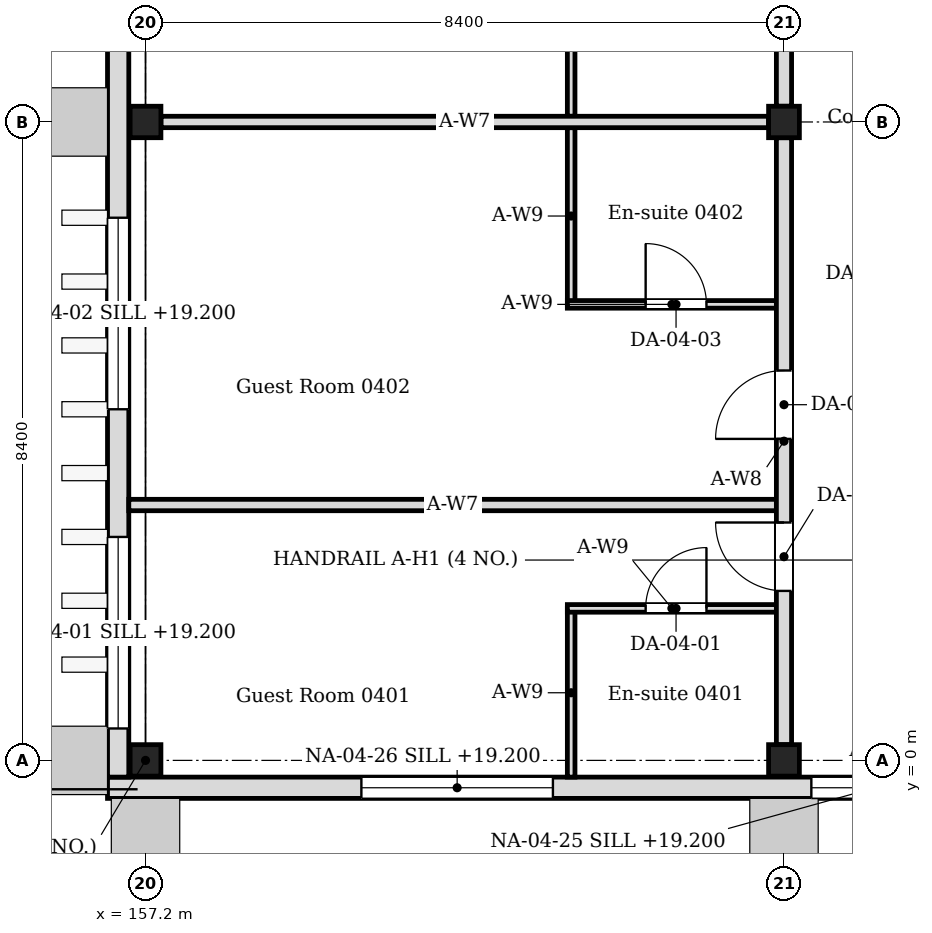
"""IFC4 building model, lengths in metres.
Left out: names, types, materials, properties, quantities, classifications, styles, units other than length and angle.
Written with IfcOpenShell. Run it as: python <this file> out.ifc"""

import sys

from ifc_helpers import new_model, si_unit, direction, frame, frame_2d, origin, origin_2d, place, context, subcontext, project, spatial, rectangle, i_section, extrude, element, fill, save


model = new_model("IFC4")
c1 = context("Model", 3, precision=1e-05, world=origin(), true_north=direction((0.0, 1.0)))
c2 = subcontext(c1, "Body", "Model", "MODEL_VIEW")
j1 = project(units=[si_unit("LENGTHUNIT", "METRE"), si_unit("PLANEANGLEUNIT", "RADIAN")], contexts=[c1])
p1 = place(None, origin())
s1 = spatial("IfcSite", under=j1, at=p1, CompositionType="ELEMENT")
p2 = place(p1, origin())
s2 = spatial("IfcBuilding", under=s1, at=p2, CompositionType="ELEMENT")
p3 = place(p2, frame((0.0, 0.0, 18.6)))
s3 = spatial("IfcBuildingStorey", under=s2, at=p3, CompositionType="ELEMENT", Elevation=18.6)
for number, where, z_axis, x_axis in (
    (1, (157.2, 0.0, 0.0), (0.0, 0.0, 1.0), (1.0, 0.0, 0.0)),
    (2, (157.2, 8.4, 0.0), (0.0, 0.0, 1.0), (1.0, 0.0, 0.0)),
    (3, (165.6, 0.0, 0.0), (0.0, 0.0, 1.0), (1.0, 0.0, 0.0)),
    (4, (165.6, 8.4, 0.0), (0.0, 0.0, 1.0), (1.0, 0.0, 0.0)),
):
    element("IfcColumn", number, at=place(p3, frame(where, z_axis=z_axis, x_axis=x_axis)), inside=s3, PredefinedType="COLUMN", context=c2, shape_type="SweptSolid", body=[
        extrude(i_section(OverallWidth=0.405, OverallDepth=0.414, WebThickness=0.018, FlangeThickness=0.028, FilletRadius=0.022, at=origin_2d()), origin(), (0.0, 0.0, 1.0), 4.2),
    ])
p4 = place(p3, frame((156.84, -0.22, 0.0), z_axis=(0.0, 0.0, 1.0), x_axis=(0.0, 1.0, 0.0)))
e5 = element("IfcWall", 5, at=p4, inside=s3, PredefinedType="SOLIDWALL", context=c2, shape_type="SweptSolid", body=[
    extrude(rectangle(XDim=25.77, YDim=0.28, at=frame_2d((12.885, 0.0))), origin(), (0.0, 0.0, 1.0), 4.05),
])
p5 = place(p4, frame((0.64, 0.0, 0.6)))
e6 = element("IfcOpeningElement", 6, at=p5, cuts=e5, PredefinedType="OPENING", context=c2, shape_type="SweptSolid", body=[
    extrude(rectangle(XDim=2.52, YDim=2.4, at=frame_2d((1.26, 1.2))), frame((0.0, 0.15, 0.0), z_axis=(0.0, -1.0, 0.0), x_axis=(1.0, 0.0, 0.0)), (0.0, 0.0, 1.0), 0.3),
])
p6 = place(p4, frame((4.84, 0.0, 0.6)))
e7 = element("IfcOpeningElement", 7, at=p6, cuts=e5, PredefinedType="OPENING", context=c2, shape_type="SweptSolid", body=[
    extrude(rectangle(XDim=2.52, YDim=2.4, at=frame_2d((1.26, 1.2))), frame((0.0, 0.15, 0.0), z_axis=(0.0, -1.0, 0.0), x_axis=(1.0, 0.0, 0.0)), (0.0, 0.0, 1.0), 0.3),
])
p7 = place(p4, frame((9.88, 0.0, 0.6)))
e8 = element("IfcOpeningElement", 8, at=p7, cuts=e5, PredefinedType="OPENING", context=c2, shape_type="SweptSolid", body=[
    extrude(rectangle(XDim=2.52, YDim=2.4, at=frame_2d((1.26, 1.2))), frame((0.0, 0.15, 0.0), z_axis=(0.0, -1.0, 0.0), x_axis=(1.0, 0.0, 0.0)), (0.0, 0.0, 1.0), 0.3),
])
p8 = place(p4, frame((14.08, 0.0, 0.6)))
e9 = element("IfcOpeningElement", 9, at=p8, cuts=e5, PredefinedType="OPENING", context=c2, shape_type="SweptSolid", body=[
    extrude(rectangle(XDim=2.52, YDim=2.4, at=frame_2d((1.26, 1.2))), frame((0.0, 0.15, 0.0), z_axis=(0.0, -1.0, 0.0), x_axis=(1.0, 0.0, 0.0)), (0.0, 0.0, 1.0), 0.3),
])
p9 = place(p4, frame((18.28, 0.0, 0.6)))
e10 = element("IfcOpeningElement", 10, at=p9, cuts=e5, PredefinedType="OPENING", context=c2, shape_type="SweptSolid", body=[
    extrude(rectangle(XDim=2.52, YDim=2.4, at=frame_2d((1.26, 1.2))), frame((0.0, 0.15, 0.0), z_axis=(0.0, -1.0, 0.0), x_axis=(1.0, 0.0, 0.0)), (0.0, 0.0, 1.0), 0.3),
])
p10 = place(p4, frame((22.48, 0.0, 0.6)))
e11 = element("IfcOpeningElement", 11, at=p10, cuts=e5, PredefinedType="OPENING", context=c2, shape_type="SweptSolid", body=[
    extrude(rectangle(XDim=2.52, YDim=2.4, at=frame_2d((1.26, 1.2))), frame((0.0, 0.15, 0.0), z_axis=(0.0, -1.0, 0.0), x_axis=(1.0, 0.0, 0.0)), (0.0, 0.0, 1.0), 0.3),
])
p11 = place(p3, frame((156.7, -0.36, 0.0), z_axis=(0.0, 0.0, 1.0), x_axis=(1.0, 0.0, 0.0)))
e12 = element("IfcWall", 12, at=p11, inside=s3, PredefinedType="SOLIDWALL", context=c2, shape_type="SweptSolid", body=[
    extrude(rectangle(XDim=20.2, YDim=0.28, at=frame_2d((10.1, 0.0))), origin(), (0.0, 0.0, 1.0), 4.05),
])
p12 = place(p11, frame((9.26, 0.0, 0.6)))
e13 = element("IfcOpeningElement", 13, at=p12, cuts=e12, PredefinedType="OPENING", context=c2, shape_type="SweptSolid", body=[
    extrude(rectangle(XDim=1.68, YDim=2.4, at=frame_2d((0.84, 1.2))), frame((0.0, 0.15, 0.0), z_axis=(0.0, -1.0, 0.0), x_axis=(1.0, 0.0, 0.0)), (0.0, 0.0, 1.0), 0.3),
])
p13 = place(p11, frame((3.34, 0.0, 0.6)))
e14 = element("IfcOpeningElement", 14, at=p13, cuts=e12, PredefinedType="OPENING", context=c2, shape_type="SweptSolid", body=[
    extrude(rectangle(XDim=2.52, YDim=2.4, at=frame_2d((1.26, 1.2))), frame((0.0, 0.15, 0.0), z_axis=(0.0, -1.0, 0.0), x_axis=(1.0, 0.0, 0.0)), (0.0, 0.0, 1.0), 0.3),
])
p14 = place(p3, frame((162.8, -0.22, 0.0), z_axis=(0.0, 0.0, 1.0), x_axis=(0.0, 1.0, 0.0)))
e15 = element("IfcWall", 15, at=p14, inside=s3, PredefinedType="PARTITIONING", context=c2, shape_type="SweptSolid", body=[
    extrude(rectangle(XDim=2.22, YDim=0.1, at=frame_2d((1.11, 0.0))), origin(), (0.0, 0.0, 1.0), 4.05),
])
p15 = place(p3, frame((162.75, 2.0, 0.0), z_axis=(0.0, 0.0, 1.0), x_axis=(1.0, 0.0, 0.0)))
e16 = element("IfcWall", 16, at=p15, inside=s3, PredefinedType="PARTITIONING", context=c2, shape_type="SweptSolid", body=[
    extrude(rectangle(XDim=2.75, YDim=0.1, at=frame_2d((1.375, 0.0))), origin(), (0.0, 0.0, 1.0), 4.05),
])
p16 = place(p15, frame((1.03, 0.0, 0.0)))
e17 = element("IfcOpeningElement", 17, at=p16, cuts=e16, PredefinedType="OPENING", context=c2, shape_type="SweptSolid", body=[
    extrude(rectangle(XDim=0.8, YDim=2.1, at=frame_2d((0.4, 1.05))), frame((0.0, 0.06, 0.0), z_axis=(0.0, -1.0, 0.0), x_axis=(1.0, 0.0, 0.0)), (0.0, 0.0, 1.0), 0.12),
])
p17 = place(p3, frame((162.8, 6.0, 0.0), z_axis=(0.0, 0.0, 1.0), x_axis=(0.0, 1.0, 0.0)))
e18 = element("IfcWall", 18, at=p17, inside=s3, PredefinedType="PARTITIONING", context=c2, shape_type="SweptSolid", body=[
    extrude(rectangle(XDim=2.325, YDim=0.1, at=frame_2d((1.163, 0.0))), origin(), (0.0, 0.0, 1.0), 4.05),
])
p18 = place(p3, frame((162.75, 6.0, 0.0), z_axis=(0.0, 0.0, 1.0), x_axis=(1.0, 0.0, 0.0)))
e19 = element("IfcWall", 19, at=p18, inside=s3, PredefinedType="PARTITIONING", context=c2, shape_type="SweptSolid", body=[
    extrude(rectangle(XDim=2.75, YDim=0.1, at=frame_2d((1.375, 0.0))), origin(), (0.0, 0.0, 1.0), 4.05),
])
p19 = place(p18, frame((1.03, 0.0, 0.0)))
e20 = element("IfcOpeningElement", 20, at=p19, cuts=e19, PredefinedType="OPENING", context=c2, shape_type="SweptSolid", body=[
    extrude(rectangle(XDim=0.8, YDim=2.1, at=frame_2d((0.4, 1.05))), frame((0.0, 0.06, 0.0), z_axis=(0.0, -1.0, 0.0), x_axis=(1.0, 0.0, 0.0)), (0.0, 0.0, 1.0), 0.12),
])
p20 = place(p3, frame((162.8, 8.475, 0.0), z_axis=(0.0, 0.0, 1.0), x_axis=(0.0, 1.0, 0.0)))
e21 = element("IfcWall", 21, at=p20, inside=s3, PredefinedType="PARTITIONING", context=c2, shape_type="SweptSolid", body=[
    extrude(rectangle(XDim=2.325, YDim=0.1, at=frame_2d((1.163, 0.0))), origin(), (0.0, 0.0, 1.0), 4.05),
])
p21 = place(p3, frame((157.403, 8.4, 0.0), z_axis=(0.0, 0.0, 1.0), x_axis=(1.0, 0.0, 0.0)))
e22 = element("IfcWall", 22, at=p21, inside=s3, PredefinedType="PARTITIONING", context=c2, shape_type="SweptSolid", body=[
    extrude(rectangle(XDim=7.995, YDim=0.15, at=frame_2d((3.998, 0.0))), origin(), (0.0, 0.0, 1.0), 3.604),
])
p22 = place(p3, frame((156.98, 3.36, 0.0), z_axis=(0.0, 0.0, 1.0), x_axis=(1.0, 0.0, 0.0)))
e23 = element("IfcWall", 23, at=p22, inside=s3, PredefinedType="PARTITIONING", context=c2, shape_type="SweptSolid", body=[
    extrude(rectangle(XDim=8.52, YDim=0.15, at=frame_2d((4.26, 0.0))), origin(), (0.0, 0.0, 1.0), 3.604),
])
p23 = place(p3, frame((165.6, 0.207, 0.0), z_axis=(0.0, 0.0, 1.0), x_axis=(0.0, 1.0, 0.0)))
e24 = element("IfcWall", 24, at=p23, inside=s3, PredefinedType="PARTITIONING", context=c2, shape_type="SweptSolid", body=[
    extrude(rectangle(XDim=7.986, YDim=0.2, at=frame_2d((3.993, 0.0))), origin(), (0.0, 0.0, 1.0), 3.45),
])
p24 = place(p23, frame((2.023, 0.0, 0.0)))
e25 = element("IfcOpeningElement", 25, at=p24, cuts=e24, PredefinedType="OPENING", context=c2, shape_type="SweptSolid", body=[
    extrude(rectangle(XDim=0.9, YDim=2.1, at=frame_2d((0.45, 1.05))), frame((0.0, 0.11, 0.0), z_axis=(0.0, -1.0, 0.0), x_axis=(1.0, 0.0, 0.0)), (0.0, 0.0, 1.0), 0.22),
])
p25 = place(p23, frame((4.023, 0.0, 0.0)))
e26 = element("IfcOpeningElement", 26, at=p25, cuts=e24, PredefinedType="OPENING", context=c2, shape_type="SweptSolid", body=[
    extrude(rectangle(XDim=0.9, YDim=2.1, at=frame_2d((0.45, 1.05))), frame((0.0, 0.11, 0.0), z_axis=(0.0, -1.0, 0.0), x_axis=(1.0, 0.0, 0.0)), (0.0, 0.0, 1.0), 0.22),
])
p26 = place(p3, frame((165.6, 8.607, 0.0), z_axis=(0.0, 0.0, 1.0), x_axis=(0.0, 1.0, 0.0)))
e27 = element("IfcWall", 27, at=p26, inside=s3, PredefinedType="PARTITIONING", context=c2, shape_type="SweptSolid", body=[
    extrude(rectangle(XDim=7.986, YDim=0.2, at=frame_2d((3.993, 0.0))), origin(), (0.0, 0.0, 1.0), 3.45),
])
p27 = place(p26, frame((3.063, 0.0, 0.0)))
e28 = element("IfcOpeningElement", 28, at=p27, cuts=e27, PredefinedType="OPENING", context=c2, shape_type="SweptSolid", body=[
    extrude(rectangle(XDim=0.9, YDim=2.1, at=frame_2d((0.45, 1.05))), frame((0.0, 0.11, 0.0), z_axis=(0.0, -1.0, 0.0), x_axis=(1.0, 0.0, 0.0)), (0.0, 0.0, 1.0), 0.22),
])
p28 = place(p26, frame((5.063, 0.0, 0.0)))
e29 = element("IfcOpeningElement", 29, at=p28, cuts=e27, PredefinedType="OPENING", context=c2, shape_type="SweptSolid", body=[
    extrude(rectangle(XDim=0.9, YDim=2.1, at=frame_2d((0.45, 1.05))), frame((0.0, 0.11, 0.0), z_axis=(0.0, -1.0, 0.0), x_axis=(1.0, 0.0, 0.0)), (0.0, 0.0, 1.0), 0.22),
])
p29 = place(p5, origin())
e30 = element("IfcWindow", 30, at=p29, inside=s3, PartitioningType="SINGLE_PANEL", PredefinedType="WINDOW", context=c2, shape_type="SweptSolid", body=[
    extrude(rectangle(XDim=2.52, YDim=2.4, at=frame_2d((1.26, 1.2))), frame((0.0, 0.03, 0.0), z_axis=(0.0, -1.0, 0.0), x_axis=(1.0, 0.0, 0.0)), (0.0, 0.0, 1.0), 0.06),
])
fill(e6, e30)
p30 = place(p6, origin())
e31 = element("IfcWindow", 31, at=p30, inside=s3, PartitioningType="SINGLE_PANEL", PredefinedType="WINDOW", context=c2, shape_type="SweptSolid", body=[
    extrude(rectangle(XDim=2.52, YDim=2.4, at=frame_2d((1.26, 1.2))), frame((0.0, 0.03, 0.0), z_axis=(0.0, -1.0, 0.0), x_axis=(1.0, 0.0, 0.0)), (0.0, 0.0, 1.0), 0.06),
])
fill(e7, e31)
p31 = place(p12, origin())
e32 = element("IfcWindow", 32, at=p31, inside=s3, PartitioningType="SINGLE_PANEL", PredefinedType="WINDOW", context=c2, shape_type="SweptSolid", body=[
    extrude(rectangle(XDim=1.68, YDim=2.4, at=frame_2d((0.84, 1.2))), frame((0.0, 0.03, 0.0), z_axis=(0.0, -1.0, 0.0), x_axis=(1.0, 0.0, 0.0)), (0.0, 0.0, 1.0), 0.06),
])
fill(e13, e32)
p32 = place(p13, origin())
e33 = element("IfcWindow", 33, at=p32, inside=s3, PartitioningType="SINGLE_PANEL", PredefinedType="WINDOW", context=c2, shape_type="SweptSolid", body=[
    extrude(rectangle(XDim=2.52, YDim=2.4, at=frame_2d((1.26, 1.2))), frame((0.0, 0.03, 0.0), z_axis=(0.0, -1.0, 0.0), x_axis=(1.0, 0.0, 0.0)), (0.0, 0.0, 1.0), 0.06),
])
fill(e14, e33)
p33 = place(p16, origin())
e34 = element("IfcDoor", 34, at=p33, inside=s3, OperationType="SINGLE_SWING_RIGHT", PredefinedType="DOOR", context=c2, shape_type="SweptSolid", body=[
    extrude(rectangle(XDim=0.8, YDim=2.1, at=frame_2d((0.4, 1.05))), frame((0.0, 0.025, 0.0), z_axis=(0.0, -1.0, 0.0), x_axis=(1.0, 0.0, 0.0)), (0.0, 0.0, 1.0), 0.05),
])
fill(e17, e34)
p34 = place(p24, origin())
e35 = element("IfcDoor", 35, at=p34, inside=s3, OperationType="SINGLE_SWING_RIGHT", PredefinedType="DOOR", context=c2, shape_type="SweptSolid", body=[
    extrude(rectangle(XDim=0.9, YDim=2.1, at=frame_2d((0.45, 1.05))), frame((0.0, 0.025, 0.0), z_axis=(0.0, -1.0, 0.0), x_axis=(1.0, 0.0, 0.0)), (0.0, 0.0, 1.0), 0.05),
])
fill(e25, e35)
p35 = place(p19, origin())
e36 = element("IfcDoor", 36, at=p35, inside=s3, OperationType="SINGLE_SWING_LEFT", PredefinedType="DOOR", context=c2, shape_type="SweptSolid", body=[
    extrude(rectangle(XDim=0.8, YDim=2.1, at=frame_2d((0.4, 1.05))), frame((0.0, 0.025, 0.0), z_axis=(0.0, -1.0, 0.0), x_axis=(1.0, 0.0, 0.0)), (0.0, 0.0, 1.0), 0.05),
])
fill(e20, e36)
p36 = place(p25, origin())
e37 = element("IfcDoor", 37, at=p36, inside=s3, OperationType="SINGLE_SWING_LEFT", PredefinedType="DOOR", context=c2, shape_type="SweptSolid", body=[
    extrude(rectangle(XDim=0.9, YDim=2.1, at=frame_2d((0.45, 1.05))), frame((0.0, 0.025, 0.0), z_axis=(0.0, -1.0, 0.0), x_axis=(1.0, 0.0, 0.0)), (0.0, 0.0, 1.0), 0.05),
])
fill(e26, e37)
save(model, sys.argv[1])
